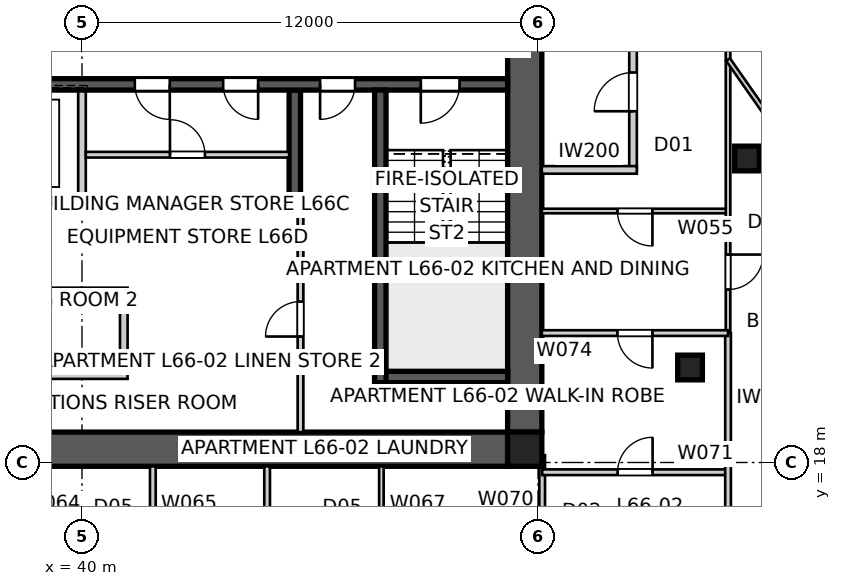
"""IFC4 building model, lengths in metres.
Left out: names, types, materials, properties, quantities, classifications, styles, units other than length and angle.
Written with IfcOpenShell. Run it as: python <this file> out.ifc"""

import sys

from ifc_helpers import new_model, si_unit, direction, frame, frame_2d, origin, origin_2d, place, context, subcontext, project, spatial, polyline, rectangle, outline, extrude, element, fill, save


model = new_model("IFC4")
c1 = context("Model", 3, precision=1e-05, world=origin(), true_north=direction((0.0, 1.0)))
c2 = subcontext(c1, "Body", "Model", "MODEL_VIEW")
j1 = project(units=[si_unit("LENGTHUNIT", "METRE"), si_unit("PLANEANGLEUNIT", "RADIAN")], contexts=[c1])
p1 = place(None, origin())
s1 = spatial("IfcSite", under=j1, at=p1, CompositionType="ELEMENT")
p2 = place(p1, origin())
s2 = spatial("IfcBuilding", under=s1, at=p2, CompositionType="ELEMENT")
p3 = place(p2, frame((0.0, 0.0, 240.4)))
s3 = spatial("IfcBuildingStorey", under=s2, at=p3, CompositionType="ELEMENT", Elevation=240.4)
p4 = place(p3, frame((51.2, 18.35, 0.0), z_axis=(0.0, 0.0, 1.0), x_axis=(-1.0, 0.0, 0.0)))
e1 = element("IfcWall", 1, at=p4, inside=s3, PredefinedType="SHEAR", context=c2, shape_type="SweptSolid", body=[
    extrude(outline(polyline([(0.0, -0.45), (22.4, -0.45), (22.4, -0.025), (22.85, -0.025), (22.85, 0.025), (22.4, 0.025), (22.4, 0.45), (0.0, 0.45), (0.0, 0.025), (-0.45, 0.025), (-0.45, -0.025), (0.0, -0.025), (0.0, -0.45)])), origin(), (0.0, 0.0, 1.0), 3.4),
])
p5 = place(p3, frame((51.65, 18.8, 0.0), z_axis=(0.0, 0.0, 1.0), x_axis=(0.0, 1.0, 0.0)))
e2 = element("IfcWall", 2, at=p5, inside=s3, PredefinedType="SHEAR", context=c2, shape_type="SweptSolid", body=[
    extrude(outline(polyline([(0.0, -0.45), (22.4, -0.45), (22.4, -0.025), (22.85, -0.025), (22.85, 0.025), (22.4, 0.025), (22.4, 0.45), (0.0, 0.45), (0.0, 0.025), (-0.45, 0.025), (-0.45, -0.025), (0.0, -0.025), (0.0, -0.45)])), origin(), (0.0, 0.0, 1.0), 3.4),
])
p6 = place(p5, frame((11.14, 0.0, 0.0)))
e3 = element("IfcOpeningElement", 3, at=p6, cuts=e2, PredefinedType="OPENING", context=c2, shape_type="SweptSolid", body=[
    extrude(rectangle(XDim=1.02, YDim=2.4, at=frame_2d((0.51, 1.2))), frame((0.0, 0.46, 0.0), z_axis=(0.0, -1.0, 0.0), x_axis=(1.0, 0.0, 0.0)), (0.0, 0.0, 1.0), 0.92),
])
p7 = place(p3, frame((51.2, 27.95, 0.0), z_axis=(0.0, 0.0, 1.0), x_axis=(-1.0, 0.0, 0.0)))
e4 = element("IfcWall", 4, at=p7, inside=s3, PredefinedType="SHEAR", context=c2, shape_type="SweptSolid", body=[
    extrude(rectangle(XDim=22.4, YDim=0.3, at=frame_2d((11.2, 0.0))), origin(), (0.0, 0.0, 1.0), 3.4),
])
p8 = place(p7, frame((19.04, 0.0, 0.0)))
e5 = element("IfcOpeningElement", 5, at=p8, cuts=e4, PredefinedType="OPENING", context=c2, shape_type="SweptSolid", body=[
    extrude(rectangle(XDim=0.92, YDim=2.1, at=frame_2d((0.46, 1.05))), frame((0.0, 0.16, 0.0), z_axis=(0.0, -1.0, 0.0), x_axis=(1.0, 0.0, 0.0)), (0.0, 0.0, 1.0), 0.32),
])
p9 = place(p7, frame((1.265, 0.0, 0.0)))
e6 = element("IfcOpeningElement", 6, at=p9, cuts=e4, PredefinedType="OPENING", context=c2, shape_type="SweptSolid", body=[
    extrude(rectangle(XDim=1.02, YDim=2.1, at=frame_2d((0.51, 1.05))), frame((0.0, 0.16, 0.0), z_axis=(0.0, -1.0, 0.0), x_axis=(1.0, 0.0, 0.0)), (0.0, 0.0, 1.0), 0.32),
])
p10 = place(p7, frame((4.015, 0.0, 0.0)))
e7 = element("IfcOpeningElement", 7, at=p10, cuts=e4, PredefinedType="OPENING", context=c2, shape_type="SweptSolid", body=[
    extrude(rectangle(XDim=0.92, YDim=2.1, at=frame_2d((0.46, 1.05))), frame((0.0, 0.16, 0.0), z_axis=(0.0, -1.0, 0.0), x_axis=(1.0, 0.0, 0.0)), (0.0, 0.0, 1.0), 0.32),
])
p11 = place(p7, frame((8.89, 0.0, 0.0)))
e8 = element("IfcOpeningElement", 8, at=p11, cuts=e4, PredefinedType="OPENING", context=c2, shape_type="SweptSolid", body=[
    extrude(rectangle(XDim=0.92, YDim=2.1, at=frame_2d((0.46, 1.05))), frame((0.0, 0.16, 0.0), z_axis=(0.0, -1.0, 0.0), x_axis=(1.0, 0.0, 0.0)), (0.0, 0.0, 1.0), 0.32),
])
p12 = place(p7, frame((6.565, 0.0, 0.0)))
e9 = element("IfcOpeningElement", 9, at=p12, cuts=e4, PredefinedType="OPENING", context=c2, shape_type="SweptSolid", body=[
    extrude(rectangle(XDim=0.92, YDim=2.1, at=frame_2d((0.46, 1.05))), frame((0.0, 0.16, 0.0), z_axis=(0.0, -1.0, 0.0), x_axis=(1.0, 0.0, 0.0)), (0.0, 0.0, 1.0), 0.32),
])
p13 = place(p7, frame((12.05, 0.0, 0.0)))
e10 = element("IfcOpeningElement", 10, at=p13, cuts=e4, PredefinedType="OPENING", context=c2, shape_type="SweptSolid", body=[
    extrude(rectangle(XDim=1.1, YDim=2.1, at=frame_2d((0.55, 1.05))), frame((0.0, 0.16, 0.0), z_axis=(0.0, -1.0, 0.0), x_axis=(1.0, 0.0, 0.0)), (0.0, 0.0, 1.0), 0.32),
])
p14 = place(p7, frame((14.85, 0.0, 0.0)))
e11 = element("IfcOpeningElement", 11, at=p14, cuts=e4, PredefinedType="OPENING", context=c2, shape_type="SweptSolid", body=[
    extrude(rectangle(XDim=1.1, YDim=2.1, at=frame_2d((0.55, 1.05))), frame((0.0, 0.16, 0.0), z_axis=(0.0, -1.0, 0.0), x_axis=(1.0, 0.0, 0.0)), (0.0, 0.0, 1.0), 0.32),
])
p15 = place(p3, frame((45.75, 24.85, 0.0), z_axis=(0.0, 0.0, 1.0), x_axis=(-1.0, 0.0, 0.0)))
e12 = element("IfcWall", 12, at=p15, inside=s3, PredefinedType="SHEAR", context=c2, shape_type="SweptSolid", body=[
    extrude(rectangle(XDim=11.5, YDim=0.3, at=frame_2d((5.75, 0.0))), origin(), (0.0, 0.0, 1.0), 3.4),
])
p16 = place(p3, frame((45.6, 27.8, 0.0), z_axis=(0.0, 0.0, 1.0), x_axis=(0.0, -1.0, 0.0)))
e13 = element("IfcWall", 13, at=p16, inside=s3, PredefinedType="SHEAR", context=c2, shape_type="SweptSolid", body=[
    extrude(rectangle(XDim=2.8, YDim=0.3, at=frame_2d((1.4, 0.0))), origin(), (0.0, 0.0, 1.0), 3.4),
])
p17 = place(p3, frame((40.0, 27.8, 0.0), z_axis=(0.0, 0.0, 1.0), x_axis=(0.0, -1.0, 0.0)))
e14 = element("IfcWall", 14, at=p17, inside=s3, PredefinedType="SOLIDWALL", context=c2, shape_type="SweptSolid", body=[
    extrude(rectangle(XDim=2.8, YDim=0.2, at=frame_2d((1.4, 0.0))), origin(), (0.0, 0.0, 1.0), 3.4),
])
p18 = place(p3, frame((47.85, 27.8, 0.0), z_axis=(0.0, 0.0, 1.0), x_axis=(0.0, -1.0, 0.0)))
e15 = element("IfcWall", 15, at=p18, inside=s3, PredefinedType="SHEAR", context=c2, shape_type="SweptSolid", body=[
    extrude(rectangle(XDim=7.7, YDim=0.3, at=frame_2d((3.85, 0.0))), origin(), (0.0, 0.0, 1.0), 3.4),
])
p19 = place(p3, frame((51.2, 20.25, 0.0), z_axis=(0.0, 0.0, 1.0), x_axis=(-1.0, 0.0, 0.0)))
e16 = element("IfcWall", 16, at=p19, inside=s3, PredefinedType="SHEAR", context=c2, shape_type="SweptSolid", body=[
    extrude(rectangle(XDim=3.5, YDim=0.3, at=frame_2d((1.75, 0.0))), origin(), (0.0, 0.0, 1.0), 3.4),
])
p20 = place(p3, frame((41.1, 22.4, 0.0), z_axis=(0.0, 0.0, 1.0), x_axis=(0.0, -1.0, 0.0)))
e17 = element("IfcWall", 17, at=p20, inside=s3, PredefinedType="SOLIDWALL", context=c2, shape_type="SweptSolid", body=[
    extrude(rectangle(XDim=2.0, YDim=0.2, at=frame_2d((1.0, 0.0))), origin(), (0.0, 0.0, 1.0), 3.4),
])
for number, where, z_axis, x_axis in (
    (18, (38.8, 22.5, 0.0), (0.0, 0.0, 1.0), (1.0, 0.0, 0.0)),
    (19, (38.8, 20.3, 0.0), (0.0, 0.0, 1.0), (1.0, 0.0, 0.0)),
):
    element("IfcWall", number, at=place(p3, frame(where, z_axis=z_axis, x_axis=x_axis)), inside=s3, PredefinedType="SOLIDWALL", context=c2, shape_type="SweptSolid", body=[
        extrude(rectangle(XDim=2.4, YDim=0.2, at=frame_2d((1.2, 0.0))), origin(), (0.0, 0.0, 1.0), 3.4),
    ])
p21 = place(p3, frame((51.65, 18.35, 0.0), z_axis=(0.0, 0.0, 1.0), x_axis=(1.0, 0.0, 0.0)))
e20 = element("IfcColumn", 20, at=p21, inside=s3, PredefinedType="COLUMN", context=c2, shape_type="SweptSolid", body=[
    extrude(rectangle(XDim=0.9, YDim=0.9, at=origin_2d()), origin(), (0.0, 0.0, 1.0), 3.4),
])
for number, where, z_axis, x_axis in (
    (21, (57.5, 26.0, 0.0), (0.0, 0.0, 1.0), (1.0, 0.0, 0.0)),
    (22, (56.0, 20.5, 0.0), (0.0, 0.0, 1.0), (1.0, 0.0, 0.0)),
):
    element("IfcColumn", number, at=place(p3, frame(where, z_axis=z_axis, x_axis=x_axis)), inside=s3, PredefinedType="COLUMN", context=c2, shape_type="SweptSolid", body=[
        extrude(rectangle(XDim=0.65, YDim=0.65, at=origin_2d()), origin(), (0.0, 0.0, 1.0), 3.4),
    ])
p22 = place(p3, frame((54.5, 25.7, 0.0), z_axis=(0.0, 0.0, 1.0), x_axis=(0.0, 1.0, 0.0)))
e23 = element("IfcWall", 23, at=p22, inside=s3, PredefinedType="PARTITIONING", context=c2, shape_type="SweptSolid", body=[
    extrude(rectangle(XDim=8.6, YDim=0.2, at=frame_2d((4.3, 0.0))), origin(), (0.0, 0.0, 1.0), 3.25),
])
p23 = place(p22, frame((5.438, 0.0, 0.0)))
e24 = element("IfcOpeningElement", 24, at=p23, cuts=e23, PredefinedType="OPENING", context=c2, shape_type="SweptSolid", body=[
    extrude(rectangle(XDim=1.02, YDim=2.34, at=frame_2d((0.51, 1.17))), frame((0.0, 0.11, 0.0), z_axis=(0.0, -1.0, 0.0), x_axis=(1.0, 0.0, 0.0)), (0.0, 0.0, 1.0), 0.22),
])
p24 = place(p22, frame((1.543, 0.0, 0.0)))
e25 = element("IfcOpeningElement", 25, at=p24, cuts=e23, PredefinedType="OPENING", context=c2, shape_type="SweptSolid", body=[
    extrude(rectangle(XDim=1.02, YDim=2.34, at=frame_2d((0.51, 1.17))), frame((0.0, 0.11, 0.0), z_axis=(0.0, -1.0, 0.0), x_axis=(1.0, 0.0, 0.0)), (0.0, 0.0, 1.0), 0.22),
])
p25 = place(p3, frame((52.1, 25.7, 0.0), z_axis=(0.0, 0.0, 1.0), x_axis=(1.0, 0.0, 0.0)))
e26 = element("IfcWall", 26, at=p25, inside=s3, PredefinedType="PARTITIONING", context=c2, shape_type="SweptSolid", body=[
    extrude(rectangle(XDim=2.5, YDim=0.2, at=frame_2d((1.25, 0.0))), origin(), (0.0, 0.0, 1.0), 3.25),
])
p26 = place(p3, frame((45.75, 18.8, 0.0), z_axis=(0.0, 0.0, 1.0), x_axis=(0.0, 1.0, 0.0)))
e27 = element("IfcWall", 27, at=p26, inside=s3, PredefinedType="SOLIDWALL", context=c2, shape_type="SweptSolid", body=[
    extrude(rectangle(XDim=5.95, YDim=0.15, at=frame_2d((2.975, 0.0))), origin(), (0.0, 0.0, 1.0), 3.25),
])
p27 = place(p26, frame((2.515, 0.0, 0.0)))
e28 = element("IfcOpeningElement", 28, at=p27, cuts=e27, PredefinedType="OPENING", context=c2, shape_type="SweptSolid", body=[
    extrude(rectangle(XDim=0.92, YDim=2.1, at=frame_2d((0.46, 1.05))), frame((0.0, 0.085, 0.0), z_axis=(0.0, -1.0, 0.0), x_axis=(1.0, 0.0, 0.0)), (0.0, 0.0, 1.0), 0.17),
])
p28 = place(p3, frame((57.0, 24.618, 0.0), z_axis=(0.0, 0.0, 1.0), x_axis=(-1.0, 0.0, 0.0)))
e29 = element("IfcWall", 29, at=p28, inside=s3, PredefinedType="PARTITIONING", context=c2, shape_type="SweptSolid", body=[
    extrude(rectangle(XDim=4.9, YDim=0.12, at=frame_2d((2.45, 0.0))), origin(), (0.0, 0.0, 1.0), 3.25),
])
p29 = place(p28, frame((1.99, 0.0, 0.0)))
e30 = element("IfcOpeningElement", 30, at=p29, cuts=e29, PredefinedType="OPENING", context=c2, shape_type="SweptSolid", body=[
    extrude(rectangle(XDim=0.92, YDim=2.34, at=frame_2d((0.46, 1.17))), frame((0.0, 0.07, 0.0), z_axis=(0.0, -1.0, 0.0), x_axis=(1.0, 0.0, 0.0)), (0.0, 0.0, 1.0), 0.14),
])
p30 = place(p3, frame((57.0, 41.904, 0.0), z_axis=(0.0, 0.0, 1.0), x_axis=(0.0, -1.0, 0.0)))
e31 = element("IfcWall", 31, at=p30, inside=s3, PredefinedType="PARTITIONING", context=c2, shape_type="SweptSolid", body=[
    extrude(rectangle(XDim=20.498, YDim=0.12, at=frame_2d((10.249, 0.0))), origin(), (0.0, 0.0, 1.0), 2.55),
])
p31 = place(p30, frame((8.449, 0.0, 0.0)))
e32 = element("IfcOpeningElement", 32, at=p31, cuts=e31, PredefinedType="OPENING", context=c2, shape_type="SweptSolid", body=[
    extrude(rectangle(XDim=0.92, YDim=2.34, at=frame_2d((0.46, 1.17))), frame((0.0, 0.07, 0.0), z_axis=(0.0, -1.0, 0.0), x_axis=(1.0, 0.0, 0.0)), (0.0, 0.0, 1.0), 0.14),
])
p32 = place(p30, frame((11.574, 0.0, 0.0)))
e33 = element("IfcOpeningElement", 33, at=p32, cuts=e31, PredefinedType="OPENING", context=c2, shape_type="SweptSolid", body=[
    extrude(rectangle(XDim=0.92, YDim=2.34, at=frame_2d((0.46, 1.17))), frame((0.0, 0.07, 0.0), z_axis=(0.0, -1.0, 0.0), x_axis=(1.0, 0.0, 0.0)), (0.0, 0.0, 1.0), 0.14),
])
p33 = place(p30, frame((18.432, 0.0, 0.0)))
e34 = element("IfcOpeningElement", 34, at=p33, cuts=e31, PredefinedType="OPENING", context=c2, shape_type="SweptSolid", body=[
    extrude(rectangle(XDim=0.92, YDim=2.34, at=frame_2d((0.46, 1.17))), frame((0.0, 0.07, 0.0), z_axis=(0.0, -1.0, 0.0), x_axis=(1.0, 0.0, 0.0)), (0.0, 0.0, 1.0), 0.14),
])
p34 = place(p3, frame((41.865, 17.9, 0.0), z_axis=(0.0, 0.0, 1.0), x_axis=(0.0, -1.0, 0.0)))
e35 = element("IfcWall", 35, at=p34, inside=s3, PredefinedType="SOLIDWALL", context=c2, shape_type="SweptSolid", body=[
    extrude(rectangle(XDim=4.9, YDim=0.15, at=frame_2d((2.45, 0.0))), origin(), (0.0, 0.0, 1.0), 3.25),
])
p35 = place(p34, frame((1.97, 0.0, 0.0)))
e36 = element("IfcOpeningElement", 36, at=p35, cuts=e35, PredefinedType="OPENING", context=c2, shape_type="SweptSolid", body=[
    extrude(rectangle(XDim=0.96, YDim=2.1, at=frame_2d((0.48, 1.05))), frame((0.0, 0.085, 0.0), z_axis=(0.0, -1.0, 0.0), x_axis=(1.0, 0.0, 0.0)), (0.0, 0.0, 1.0), 0.17),
])
p36 = place(p3, frame((44.871, 13.0, 0.0), z_axis=(0.0, 0.0, 1.0), x_axis=(0.0, 1.0, 0.0)))
e37 = element("IfcWall", 37, at=p36, inside=s3, PredefinedType="SOLIDWALL", context=c2, shape_type="SweptSolid", body=[
    extrude(rectangle(XDim=4.9, YDim=0.15, at=frame_2d((2.45, 0.0))), origin(), (0.0, 0.0, 1.0), 3.25),
])
p37 = place(p36, frame((1.97, 0.0, 0.0)))
e38 = element("IfcOpeningElement", 38, at=p37, cuts=e37, PredefinedType="OPENING", context=c2, shape_type="SweptSolid", body=[
    extrude(rectangle(XDim=0.96, YDim=2.1, at=frame_2d((0.48, 1.05))), frame((0.0, 0.085, 0.0), z_axis=(0.0, -1.0, 0.0), x_axis=(1.0, 0.0, 0.0)), (0.0, 0.0, 1.0), 0.17),
])
p38 = place(p3, frame((47.878, 17.9, 0.0), z_axis=(0.0, 0.0, 1.0), x_axis=(0.0, -1.0, 0.0)))
e39 = element("IfcWall", 39, at=p38, inside=s3, PredefinedType="PARTITIONING", context=c2, shape_type="SweptSolid", body=[
    extrude(rectangle(XDim=4.9, YDim=0.12, at=frame_2d((2.45, 0.0))), origin(), (0.0, 0.0, 1.0), 3.25),
])
p39 = place(p38, frame((1.97, 0.0, 0.0)))
e40 = element("IfcOpeningElement", 40, at=p39, cuts=e39, PredefinedType="OPENING", context=c2, shape_type="SweptSolid", body=[
    extrude(rectangle(XDim=0.96, YDim=2.1, at=frame_2d((0.48, 1.05))), frame((0.0, 0.07, 0.0), z_axis=(0.0, -1.0, 0.0), x_axis=(1.0, 0.0, 0.0)), (0.0, 0.0, 1.0), 0.14),
])
p40 = place(p3, frame((52.109, 18.194, 0.0), z_axis=(0.0, 0.0, 1.0), x_axis=(0.0, -1.0, 0.0)))
e41 = element("IfcWall", 41, at=p40, inside=s3, PredefinedType="SOLIDWALL", context=c2, shape_type="SweptSolid", body=[
    extrude(rectangle(XDim=5.194, YDim=0.15, at=frame_2d((2.597, 0.0))), origin(), (0.0, 0.0, 1.0), 3.25),
])
p41 = place(p40, frame((2.337, 0.0, 0.0)))
e42 = element("IfcOpeningElement", 42, at=p41, cuts=e41, PredefinedType="OPENING", context=c2, shape_type="SweptSolid", body=[
    extrude(rectangle(XDim=0.92, YDim=2.34, at=frame_2d((0.46, 1.17))), frame((0.0, 0.085, 0.0), z_axis=(0.0, -1.0, 0.0), x_axis=(1.0, 0.0, 0.0)), (0.0, 0.0, 1.0), 0.17),
])
p42 = place(p3, frame((52.109, 17.743, 0.0), z_axis=(0.0, 0.0, 1.0), x_axis=(1.0, 0.0, 0.0)))
e43 = element("IfcWall", 43, at=p42, inside=s3, PredefinedType="SOLIDWALL", context=c2, shape_type="SweptSolid", body=[
    extrude(rectangle(XDim=4.891, YDim=0.15, at=frame_2d((2.446, 0.0))), origin(), (0.0, 0.0, 1.0), 3.25),
])
p43 = place(p42, frame((1.986, 0.0, 0.0)))
e44 = element("IfcOpeningElement", 44, at=p43, cuts=e43, PredefinedType="OPENING", context=c2, shape_type="SweptSolid", body=[
    extrude(rectangle(XDim=0.92, YDim=2.34, at=frame_2d((0.46, 1.17))), frame((0.0, 0.085, 0.0), z_axis=(0.0, -1.0, 0.0), x_axis=(1.0, 0.0, 0.0)), (0.0, 0.0, 1.0), 0.17),
])
p44 = place(p3, frame((57.0, 21.406, 0.0), z_axis=(0.0, 0.0, 1.0), x_axis=(0.0, -1.0, 0.0)))
e45 = element("IfcWall", 45, at=p44, inside=s3, PredefinedType="SOLIDWALL", context=c2, shape_type="SweptSolid", body=[
    extrude(rectangle(XDim=5.7, YDim=0.15, at=frame_2d((2.85, 0.0))), origin(), (0.0, 0.0, 1.0), 3.25),
])
p45 = place(p3, frame((57.0, 21.406, 0.0), z_axis=(0.0, 0.0, 1.0), x_axis=(-1.0, 0.0, 0.0)))
e46 = element("IfcWall", 46, at=p45, inside=s3, PredefinedType="SOLIDWALL", context=c2, shape_type="SweptSolid", body=[
    extrude(rectangle(XDim=4.9, YDim=0.15, at=frame_2d((2.45, 0.0))), origin(), (0.0, 0.0, 1.0), 3.25),
])
p46 = place(p45, frame((1.99, 0.0, 0.0)))
e47 = element("IfcOpeningElement", 47, at=p46, cuts=e46, PredefinedType="OPENING", context=c2, shape_type="SweptSolid", body=[
    extrude(rectangle(XDim=0.92, YDim=2.34, at=frame_2d((0.46, 1.17))), frame((0.0, 0.085, 0.0), z_axis=(0.0, -1.0, 0.0), x_axis=(1.0, 0.0, 0.0)), (0.0, 0.0, 1.0), 0.17),
])
p47 = place(p3, frame((57.0, 28.604, 0.0), z_axis=(0.0, 0.0, 1.0), x_axis=(0.573575545802, -0.819152667857, 0.0)))
e48 = element("IfcWall", 48, at=p47, inside=s3, PredefinedType="PARTITIONING", context=c2, shape_type="SweptSolid", body=[
    extrude(rectangle(XDim=10.566, YDim=0.12, at=frame_2d((5.283, 0.0))), origin(), (0.0, 0.0, 1.0), 3.25),
])
p48 = place(p47, frame((8.121, 0.0, 0.0)))
e49 = element("IfcOpeningElement", 49, at=p48, cuts=e48, PredefinedType="OPENING", context=c2, shape_type="SweptSolid", body=[
    extrude(rectangle(XDim=0.92, YDim=2.34, at=frame_2d((0.46, 1.17))), frame((0.0, 0.07, 0.0), z_axis=(0.0, -1.0, 0.0), x_axis=(1.0, 0.0, 0.0)), (0.0, 0.0, 1.0), 0.14),
])
p49 = place(p3, frame((40.1, 26.1, 0.0), z_axis=(0.0, 0.0, 1.0), x_axis=(1.0, 0.0, 0.0)))
e50 = element("IfcWall", 50, at=p49, inside=s3, PredefinedType="SOLIDWALL", context=c2, shape_type="SweptSolid", body=[
    extrude(rectangle(XDim=5.35, YDim=0.15, at=frame_2d((2.675, 0.0))), origin(), (0.0, 0.0, 1.0), 3.25),
])
p50 = place(p49, frame((2.215, 0.0, 0.0)))
e51 = element("IfcOpeningElement", 51, at=p50, cuts=e50, PredefinedType="OPENING", context=c2, shape_type="SweptSolid", body=[
    extrude(rectangle(XDim=0.92, YDim=2.1, at=frame_2d((0.46, 1.05))), frame((0.0, 0.085, 0.0), z_axis=(0.0, -1.0, 0.0), x_axis=(1.0, 0.0, 0.0)), (0.0, 0.0, 1.0), 0.17),
])
p51 = place(p9, origin())
e52 = element("IfcDoor", 52, at=p51, inside=s3, OperationType="SINGLE_SWING_RIGHT", PredefinedType="DOOR", context=c2, shape_type="SweptSolid", body=[
    extrude(rectangle(XDim=1.02, YDim=2.1, at=frame_2d((0.51, 1.05))), frame((0.0, 0.025, 0.0), z_axis=(0.0, -1.0, 0.0), x_axis=(1.0, 0.0, 0.0)), (0.0, 0.0, 1.0), 0.05),
])
fill(e6, e52)
p52 = place(p10, origin())
e53 = element("IfcDoor", 53, at=p52, inside=s3, OperationType="SINGLE_SWING_RIGHT", PredefinedType="DOOR", context=c2, shape_type="SweptSolid", body=[
    extrude(rectangle(XDim=0.92, YDim=2.1, at=frame_2d((0.46, 1.05))), frame((0.0, 0.025, 0.0), z_axis=(0.0, -1.0, 0.0), x_axis=(1.0, 0.0, 0.0)), (0.0, 0.0, 1.0), 0.05),
])
fill(e7, e53)
p53 = place(p24, origin())
e54 = element("IfcDoor", 54, at=p53, inside=s3, OperationType="SINGLE_SWING_LEFT", PredefinedType="DOOR", context=c2, shape_type="SweptSolid", body=[
    extrude(rectangle(XDim=1.02, YDim=2.34, at=frame_2d((0.51, 1.17))), frame((0.0, 0.025, 0.0), z_axis=(0.0, -1.0, 0.0), x_axis=(1.0, 0.0, 0.0)), (0.0, 0.0, 1.0), 0.05),
])
fill(e25, e54)
p54 = place(p27, origin())
e55 = element("IfcDoor", 55, at=p54, inside=s3, OperationType="SINGLE_SWING_LEFT", PredefinedType="DOOR", context=c2, shape_type="SweptSolid", body=[
    extrude(rectangle(XDim=0.92, YDim=2.1, at=frame_2d((0.46, 1.05))), frame((0.0, 0.025, 0.0), z_axis=(0.0, -1.0, 0.0), x_axis=(1.0, 0.0, 0.0)), (0.0, 0.0, 1.0), 0.05),
])
fill(e28, e55)
p55 = place(p29, origin())
e56 = element("IfcDoor", 56, at=p55, inside=s3, OperationType="SINGLE_SWING_LEFT", PredefinedType="DOOR", context=c2, shape_type="SweptSolid", body=[
    extrude(rectangle(XDim=0.92, YDim=2.34, at=frame_2d((0.46, 1.17))), frame((0.0, 0.025, 0.0), z_axis=(0.0, -1.0, 0.0), x_axis=(1.0, 0.0, 0.0)), (0.0, 0.0, 1.0), 0.05),
])
fill(e30, e56)
p56 = place(p46, origin())
e57 = element("IfcDoor", 57, at=p56, inside=s3, OperationType="SINGLE_SWING_LEFT", PredefinedType="DOOR", context=c2, shape_type="SweptSolid", body=[
    extrude(rectangle(XDim=0.92, YDim=2.34, at=frame_2d((0.46, 1.17))), frame((0.0, 0.025, 0.0), z_axis=(0.0, -1.0, 0.0), x_axis=(1.0, 0.0, 0.0)), (0.0, 0.0, 1.0), 0.05),
])
fill(e47, e57)
p57 = place(p33, origin())
e58 = element("IfcDoor", 58, at=p57, inside=s3, OperationType="SINGLE_SWING_LEFT", PredefinedType="DOOR", context=c2, shape_type="SweptSolid", body=[
    extrude(rectangle(XDim=0.92, YDim=2.34, at=frame_2d((0.46, 1.17))), frame((0.0, 0.025, 0.0), z_axis=(0.0, -1.0, 0.0), x_axis=(1.0, 0.0, 0.0)), (0.0, 0.0, 1.0), 0.05),
])
fill(e34, e58)
p58 = place(p43, origin())
e59 = element("IfcDoor", 59, at=p58, inside=s3, OperationType="SINGLE_SWING_RIGHT", PredefinedType="DOOR", context=c2, shape_type="SweptSolid", body=[
    extrude(rectangle(XDim=0.92, YDim=2.34, at=frame_2d((0.46, 1.17))), frame((0.0, 0.025, 0.0), z_axis=(0.0, -1.0, 0.0), x_axis=(1.0, 0.0, 0.0)), (0.0, 0.0, 1.0), 0.05),
])
fill(e44, e59)
p59 = place(p11, origin())
e60 = element("IfcDoor", 60, at=p59, inside=s3, OperationType="SINGLE_SWING_LEFT", PredefinedType="DOOR", context=c2, shape_type="SweptSolid", body=[
    extrude(rectangle(XDim=0.92, YDim=2.1, at=frame_2d((0.46, 1.05))), frame((0.0, 0.025, 0.0), z_axis=(0.0, -1.0, 0.0), x_axis=(1.0, 0.0, 0.0)), (0.0, 0.0, 1.0), 0.05),
])
fill(e8, e60)
p60 = place(p12, origin())
e61 = element("IfcDoor", 61, at=p60, inside=s3, OperationType="SINGLE_SWING_LEFT", PredefinedType="DOOR", context=c2, shape_type="SweptSolid", body=[
    extrude(rectangle(XDim=0.92, YDim=2.1, at=frame_2d((0.46, 1.05))), frame((0.0, 0.025, 0.0), z_axis=(0.0, -1.0, 0.0), x_axis=(1.0, 0.0, 0.0)), (0.0, 0.0, 1.0), 0.05),
])
fill(e9, e61)
p61 = place(p50, origin())
e62 = element("IfcDoor", 62, at=p61, inside=s3, OperationType="SINGLE_SWING_LEFT", PredefinedType="DOOR", context=c2, shape_type="SweptSolid", body=[
    extrude(rectangle(XDim=0.92, YDim=2.1, at=frame_2d((0.46, 1.05))), frame((0.0, 0.025, 0.0), z_axis=(0.0, -1.0, 0.0), x_axis=(1.0, 0.0, 0.0)), (0.0, 0.0, 1.0), 0.05),
])
fill(e51, e62)
save(model, sys.argv[1])
